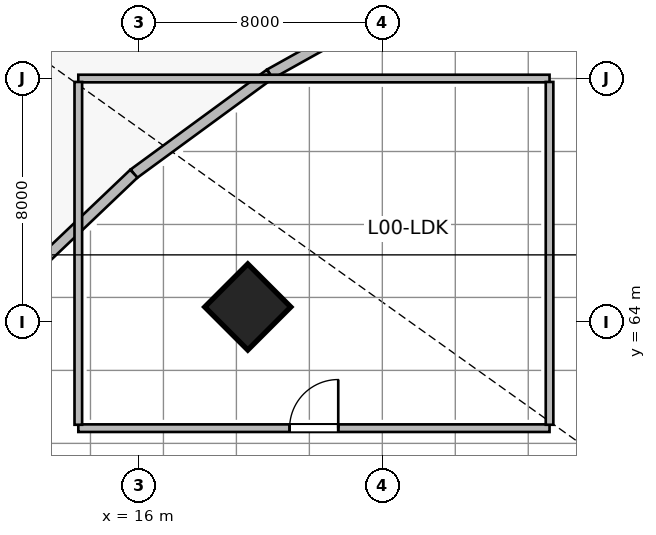
"""IFC4 building model, lengths in metres.
Left out: names, types, materials, properties, quantities, classifications, styles, units other than length and angle.
Written with IfcOpenShell. Run it as: python <this file> out.ifc"""

import sys

from ifc_helpers import new_model, si_unit, direction, frame, frame_2d, origin, origin_2d, place, context, subcontext, project, spatial, rectangle, extrude, source, transform, mapped, element, fill, save


model = new_model("IFC4")
c1 = context("Model", 3, precision=1e-05, world=origin(), true_north=direction((0.0, 1.0)))
c2 = subcontext(c1, "Body", "Model", "MODEL_VIEW")
j1 = project(units=[si_unit("LENGTHUNIT", "METRE"), si_unit("PLANEANGLEUNIT", "RADIAN")], contexts=[c1])
p1 = place(None, origin())
s1 = spatial("IfcSite", under=j1, at=p1, CompositionType="ELEMENT")
p2 = place(p1, origin())
s2 = spatial("IfcBuilding", under=s1, at=p2, CompositionType="ELEMENT")
p3 = place(p2, origin())
s3 = spatial("IfcBuildingStorey", under=s2, at=p3, CompositionType="ELEMENT", Elevation=0.0)
m1 = source(origin(), c2, "Body", "SweptSolid", [
    extrude(rectangle(XDim=2.0, YDim=2.0, at=origin_2d()), origin(), (0.0, 0.0, 1.0), 6.0),
])
p4 = place(p3, frame((19.574, 64.486, 0.0), z_axis=(0.0, 0.0, 1.0), x_axis=(-0.707106781187, 0.707106781187, 0.0)))
e1 = element("IfcColumn", 1, at=p4, inside=s3, PredefinedType="COLUMN", context=c2, shape_type="MappedRepresentation", body=[
    mapped(m1, transform((0.0, 0.0, 0.0), scale=1.0)),
])
m2 = source(origin(), c2, "Body", "SweptSolid", [
    extrude(rectangle(XDim=5.667, YDim=0.35, at=frame_2d((2.833, 0.0))), origin(), (0.0, 0.0, 1.0), 5.7),
])
p5 = place(p3, frame((20.302, 72.147, 0.0), z_axis=(0.0, 0.0, 1.0), x_axis=(0.873233089296, 0.487302751642, 0.0)))
e2 = element("IfcWall", 2, at=p5, inside=s3, PredefinedType="SOLIDWALL", context=c2, shape_type="MappedRepresentation", body=[
    mapped(m2, transform((0.0, 0.0, 0.0), scale=1.0)),
])
m3 = source(origin(), c2, "Body", "SweptSolid", [
    extrude(rectangle(XDim=5.547, YDim=0.35, at=frame_2d((2.773, 0.0))), origin(), (0.0, 0.0, 1.0), 5.7),
])
p6 = place(p3, frame((15.827, 68.87, 0.0), z_axis=(0.0, 0.0, 1.0), x_axis=(0.806767275837, 0.590869327887, 0.0)))
e3 = element("IfcWall", 3, at=p6, inside=s3, PredefinedType="SOLIDWALL", context=c2, shape_type="MappedRepresentation", body=[
    mapped(m3, transform((0.0, 0.0, 0.0), scale=1.0)),
])
m4 = source(origin(), c2, "Body", "SweptSolid", [
    extrude(rectangle(XDim=5.419, YDim=0.35, at=frame_2d((2.709, 0.0))), origin(), (0.0, 0.0, 1.0), 5.7),
])
p7 = place(p3, frame((11.902, 65.133, 0.0), z_axis=(0.0, 0.0, 1.0), x_axis=(0.724150787336, 0.689641673046, 0.0)))
e4 = element("IfcWall", 4, at=p7, inside=s3, PredefinedType="SOLIDWALL", context=c2, shape_type="MappedRepresentation", body=[
    mapped(m4, transform((0.0, 0.0, 0.0), scale=1.0)),
])
m5 = source(origin(), c2, "Body", "SweptSolid", [
    extrude(rectangle(XDim=15.5, YDim=0.25, at=frame_2d((7.75, 0.0))), origin(), (0.0, 0.0, 1.0), 5.7),
])
p8 = place(p3, frame((14.0, 60.5, 0.0), z_axis=(0.0, 0.0, 1.0), x_axis=(1.0, 0.0, 0.0)))
e5 = element("IfcWall", 5, at=p8, inside=s3, PredefinedType="PARTITIONING", context=c2, shape_type="MappedRepresentation", body=[
    mapped(m5, transform((0.0, 0.0, 0.0), scale=1.0)),
])
p9 = place(p8, frame((6.95, 0.0, 0.0)))
e6 = element("IfcOpeningElement", 6, at=p9, cuts=e5, PredefinedType="OPENING", context=c2, shape_type="SweptSolid", body=[
    extrude(rectangle(XDim=1.6, YDim=2.15, at=frame_2d((0.8, 1.075))), frame((0.0, 0.135, 0.0), z_axis=(0.0, -1.0, 0.0), x_axis=(1.0, 0.0, 0.0)), (0.0, 0.0, 1.0), 0.27),
])
p10 = place(p3, frame((14.0, 72.0, 0.0), z_axis=(0.0, 0.0, 1.0), x_axis=(1.0, 0.0, 0.0)))
e7 = element("IfcWall", 7, at=p10, inside=s3, PredefinedType="PARTITIONING", context=c2, shape_type="MappedRepresentation", body=[
    mapped(m5, transform((0.0, 0.0, 0.0), scale=1.0)),
])
m6 = source(origin(), c2, "Body", "SweptSolid", [
    extrude(rectangle(XDim=11.275, YDim=0.25, at=frame_2d((5.637, 0.0))), origin(), (0.0, 0.0, 1.0), 5.7),
])
for number, where, z_axis, x_axis in (
    (8, (14.0, 60.613, 0.0), (0.0, 0.0, 1.0), (0.0, 1.0, 0.0)),
    (9, (29.5, 60.613, 0.0), (0.0, 0.0, 1.0), (0.0, 1.0, 0.0)),
):
    element("IfcWall", number, at=place(p3, frame(where, z_axis=z_axis, x_axis=x_axis)), inside=s3, PredefinedType="PARTITIONING", context=c2, shape_type="MappedRepresentation", body=[
        mapped(m6, transform((0.0, 0.0, 0.0), scale=1.0)),
    ])
m7 = source(origin(), c2, "Body", "SweptSolid", [
    extrude(rectangle(XDim=1.6, YDim=2.15, at=frame_2d((0.8, 1.075))), frame((0.0, 0.025, 0.0), z_axis=(0.0, -1.0, 0.0), x_axis=(1.0, 0.0, 0.0)), (0.0, 0.0, 1.0), 0.05),
])
p11 = place(p9, origin())
e10 = element("IfcDoor", 10, at=p11, inside=s3, OperationType="SINGLE_SWING_RIGHT", PredefinedType="DOOR", context=c2, shape_type="MappedRepresentation", body=[
    mapped(m7, transform((0.0, 0.0, 0.0), scale=1.0)),
])
fill(e6, e10)
save(model, sys.argv[1])
